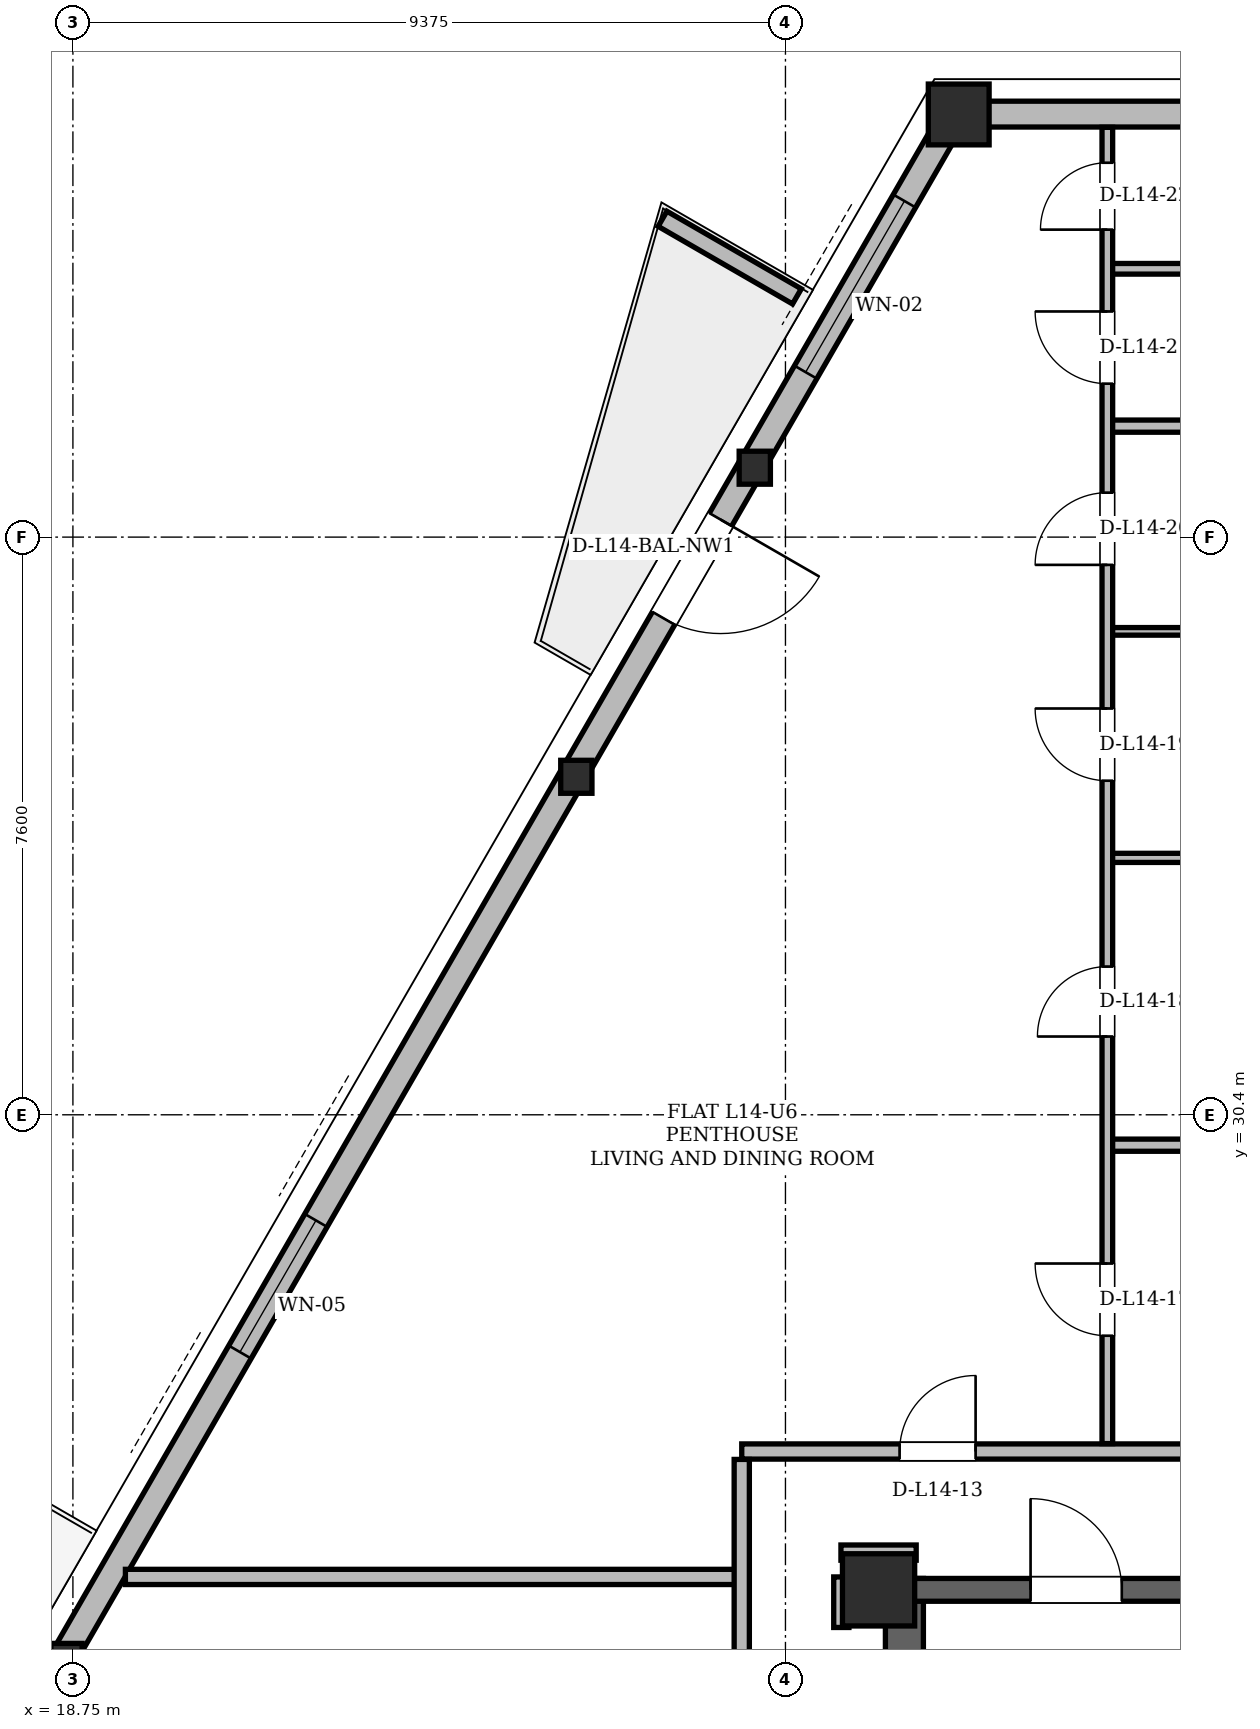
"""IFC4 building model, lengths in metres.
Left out: names, types, materials, properties, quantities, classifications, styles, units other than length and angle.
Written with IfcOpenShell. Run it as: python <this file> out.ifc"""

import sys

from ifc_helpers import new_model, si_unit, direction, frame, frame_2d, origin, origin_2d, place, context, subcontext, project, spatial, polyline, rectangle, hollow_rectangle, i_section, outline, extrude, element, fill, save


model = new_model("IFC4")
c1 = context("Model", 3, precision=1e-05, world=origin(), true_north=direction((0.0, 1.0)))
c2 = subcontext(c1, "Body", "Model", "MODEL_VIEW")
j1 = project(units=[si_unit("LENGTHUNIT", "METRE"), si_unit("PLANEANGLEUNIT", "RADIAN")], contexts=[c1])
p1 = place(None, origin())
s1 = spatial("IfcSite", under=j1, at=p1, CompositionType="ELEMENT")
p2 = place(p1, origin())
s2 = spatial("IfcBuilding", under=s1, at=p2, CompositionType="ELEMENT")
p3 = place(p2, frame((0.0, 0.0, 56.1)))
s3 = spatial("IfcBuildingStorey", under=s2, at=p3, CompositionType="ELEMENT", Elevation=56.1)
p4 = place(p3, frame((29.35, 24.15, 0.0), z_axis=(0.0, 0.0, 1.0), x_axis=(1.0, 0.0, 0.0)))
e1 = element("IfcColumn", 1, at=p4, inside=s3, PredefinedType="COLUMN", context=c2, shape_type="SweptSolid", body=[
    extrude(hollow_rectangle(XDim=0.95, YDim=0.95, WallThickness=0.08, at=origin_2d()), origin(), (0.0, 0.0, 1.0), 3.6),
])
p5 = place(p3, frame((30.351, 43.565, 0.004), z_axis=(0.029832289398, -0.002582293843, 0.999551582595), x_axis=(0.08623789021, 0.996274573746, 0.0)))
e2 = element("IfcColumn", 2, at=p5, inside=s3, PredefinedType="COLUMN", context=c2, shape_type="SweptSolid", body=[
    extrude(hollow_rectangle(XDim=0.8, YDim=0.8, WallThickness=0.065, at=origin_2d()), origin(), (0.0, 0.0, 1.0), 3.593),
])
for number, where, z_axis, x_axis in (
    (3, (27.671, 38.924, 0.004), (0.028, -0.006, 1.0), (0.214, 0.977, 0.0)),
    (4, (25.327, 34.863, 0.004), (0.026, -0.009, 1.0), (0.335, 0.942, 0.0)),
    (5, (18.628, 23.26, 0.004), (0.021, -0.018, 1.0), (0.65, 0.76, 0.0)),
):
    element("IfcColumn", number, at=place(p3, frame(where, z_axis=z_axis, x_axis=x_axis)), inside=s3, PredefinedType="COLUMN", context=c2, shape_type="SweptSolid", body=[
        extrude(i_section(OverallWidth=0.411, OverallDepth=0.434, WebThickness=0.036, FlangeThickness=0.057, at=origin_2d()), origin(), (0.0, 0.0, 1.0), 3.593),
    ])
p6 = place(p3, frame((29.69, 11.0, 0.0), z_axis=(0.0, 0.0, 1.0), x_axis=(0.0, 1.0, 0.0)))
e6 = element("IfcWall", 6, at=p6, inside=s3, PredefinedType="SHEAR", context=c2, shape_type="SweptSolid", body=[
    extrude(rectangle(XDim=13.3, YDim=0.5, at=frame_2d((6.65, 0.0))), origin(), (0.0, 0.0, 1.0), 3.36),
])
p7 = place(p3, frame((29.65, 24.15, 0.0), z_axis=(0.0, 0.0, 1.0), x_axis=(1.0, 0.0, 0.0)))
e7 = element("IfcWall", 7, at=p7, inside=s3, PredefinedType="SHEAR", context=c2, shape_type="SweptSolid", body=[
    extrude(rectangle(XDim=15.7, YDim=0.3, at=frame_2d((7.85, 0.0))), origin(), (0.0, 0.0, 1.0), 3.36),
])
p8 = place(p7, frame((1.7, 0.0, 0.0)))
e8 = element("IfcOpeningElement", 8, at=p8, cuts=e7, PredefinedType="OPENING", context=c2, shape_type="SweptSolid", body=[
    extrude(rectangle(XDim=1.2, YDim=2.2, at=frame_2d((0.6, 1.1))), frame((0.0, 0.15, 0.0), z_axis=(0.0, -1.0, 0.0), x_axis=(1.0, 0.0, 0.0)), (0.0, 0.0, 1.0), 0.3),
])
p9 = place(p7, frame((12.8, 0.0, 0.0)))
e9 = element("IfcOpeningElement", 9, at=p9, cuts=e7, PredefinedType="OPENING", context=c2, shape_type="SweptSolid", body=[
    extrude(rectangle(XDim=1.2, YDim=2.2, at=frame_2d((0.6, 1.1))), frame((0.0, 0.15, 0.0), z_axis=(0.0, -1.0, 0.0), x_axis=(1.0, 0.0, 0.0)), (0.0, 0.0, 1.0), 0.3),
])
p10 = place(p7, frame((6.55, 0.0, 0.0)))
e10 = element("IfcOpeningElement", 10, at=p10, cuts=e7, PredefinedType="OPENING", context=c2, shape_type="SweptSolid", body=[
    extrude(rectangle(XDim=0.9, YDim=2.05, at=frame_2d((0.45, 1.025))), frame((0.0, 0.15, 0.0), z_axis=(0.0, -1.0, 0.0), x_axis=(1.0, 0.0, 0.0)), (0.0, 0.0, 1.0), 0.3),
])
p11 = place(p7, frame((8.45, 0.0, 0.0)))
e11 = element("IfcOpeningElement", 11, at=p11, cuts=e7, PredefinedType="OPENING", context=c2, shape_type="SweptSolid", body=[
    extrude(rectangle(XDim=0.9, YDim=2.05, at=frame_2d((0.45, 1.025))), frame((0.0, 0.15, 0.0), z_axis=(0.0, -1.0, 0.0), x_axis=(1.0, 0.0, 0.0)), (0.0, 0.0, 1.0), 0.3),
])
p12 = place(p3, frame((44.649, 43.565, 0.0), z_axis=(0.0, 0.0, 1.0), x_axis=(-1.0, 0.0, 0.0)))
e12 = element("IfcWall", 12, at=p12, inside=s3, PredefinedType="SOLIDWALL", context=c2, shape_type="SweptSolid", body=[
    extrude(rectangle(XDim=14.298, YDim=0.34, at=frame_2d((7.149, 0.0))), origin(), (0.0, 0.0, 1.0), 2.494),
])
p13 = place(p3, frame((30.351, 43.565, 0.0), z_axis=(0.0, 0.0, 1.0), x_axis=(-0.500002389912, -0.866024023964, 0.0)))
e13 = element("IfcWall", 13, at=p13, inside=s3, PredefinedType="SOLIDWALL", context=c2, shape_type="SweptSolid", body=[
    extrude(rectangle(XDim=33.494, YDim=0.34, at=frame_2d((16.747, 0.0))), origin(), (0.0, 0.0, 1.0), 2.494),
])
p14 = place(p13, frame((6.159, 0.0, 0.0)))
e14 = element("IfcOpeningElement", 14, at=p14, cuts=e13, PredefinedType="OPENING", context=c2, shape_type="SweptSolid", body=[
    extrude(rectangle(XDim=1.5, YDim=2.2, at=frame_2d((0.75, 1.1))), frame((0.0, 0.17, 0.0), z_axis=(0.0, -1.0, 0.0), x_axis=(1.0, 0.0, 0.0)), (0.0, 0.0, 1.0), 0.34),
])
p15 = place(p13, frame((24.379, 0.0, 0.0)))
e15 = element("IfcOpeningElement", 15, at=p15, cuts=e13, PredefinedType="OPENING", context=c2, shape_type="SweptSolid", body=[
    extrude(rectangle(XDim=1.5, YDim=2.2, at=frame_2d((0.75, 1.1))), frame((0.0, 0.17, 0.0), z_axis=(0.0, -1.0, 0.0), x_axis=(1.0, 0.0, 0.0)), (0.0, 0.0, 1.0), 0.34),
])
p16 = place(p13, frame((29.886, 0.0, 0.85)))
e16 = element("IfcOpeningElement", 16, at=p16, cuts=e13, PredefinedType="OPENING", context=c2, shape_type="SweptSolid", body=[
    extrude(rectangle(XDim=2.2, YDim=1.534, at=frame_2d((1.1, 0.767))), frame((0.0, 0.17, 0.0), z_axis=(0.0, -1.0, 0.0), x_axis=(1.0, 0.0, 0.0)), (0.0, 0.0, 1.0), 0.34),
])
p17 = place(p13, frame((1.32, 0.0, 0.85)))
e17 = element("IfcOpeningElement", 17, at=p17, cuts=e13, PredefinedType="OPENING", context=c2, shape_type="SweptSolid", body=[
    extrude(rectangle(XDim=2.6, YDim=1.534, at=frame_2d((1.3, 0.767))), frame((0.0, 0.17, 0.0), z_axis=(0.0, -1.0, 0.0), x_axis=(1.0, 0.0, 0.0)), (0.0, 0.0, 1.0), 0.34),
])
p18 = place(p13, frame((16.806, 0.0, 0.85)))
e18 = element("IfcOpeningElement", 18, at=p18, cuts=e13, PredefinedType="OPENING", context=c2, shape_type="SweptSolid", body=[
    extrude(rectangle(XDim=2.0, YDim=1.534, at=frame_2d((1.0, 0.767))), frame((0.0, 0.17, 0.0), z_axis=(0.0, -1.0, 0.0), x_axis=(1.0, 0.0, 0.0)), (0.0, 0.0, 1.0), 0.34),
])
p19 = place(p3, frame((28.276, 41.167, 0.0), z_axis=(0.0, 0.0, 1.0), x_axis=(-0.866012356593, 0.500022597718, 0.0)))
e19 = element("IfcWall", 19, at=p19, inside=s3, PredefinedType="PARAPET", context=c2, shape_type="SweptSolid", body=[
    extrude(outline(polyline([(0.0, 0.0), (2.042, 0.0), (2.042, 1.1), (0.0, 1.32), (0.0, 0.0)])), frame((0.0, 0.115, 0.0), z_axis=(0.0, -1.0, 0.0), x_axis=(1.0, 0.0, 0.0)), (0.0, 0.0, 1.0), 0.23),
])
p20 = place(p3, frame((19.441, 24.32, 0.0), z_axis=(0.0, 0.0, 1.0), x_axis=(1.0, 0.0, 0.0)))
e20 = element("IfcWall", 20, at=p20, inside=s3, PredefinedType="PARTITIONING", context=c2, shape_type="SweptSolid", body=[
    extrude(rectangle(XDim=8.109, YDim=0.2, at=frame_2d((4.055, 0.0))), origin(), (0.0, 0.0, 1.0), 2.494),
])
p21 = place(p3, frame((28.855, 24.64, 0.0), z_axis=(0.0, 0.0, 1.0), x_axis=(1.0, 0.0, 0.0)))
e21 = element("IfcWall", 21, at=p21, inside=s3, PredefinedType="PARTITIONING", context=c2, shape_type="SweptSolid", body=[
    extrude(rectangle(XDim=0.99, YDim=0.2, at=frame_2d((0.495, 0.0))), origin(), (0.0, 0.0, 1.0), 2.738),
])
p22 = place(p3, frame((27.55, 25.97, 0.0), z_axis=(0.0, 0.0, 1.0), x_axis=(1.0, 0.0, 0.0)))
e22 = element("IfcWall", 22, at=p22, inside=s3, PredefinedType="PARTITIONING", context=c2, shape_type="SweptSolid", body=[
    extrude(rectangle(XDim=19.9, YDim=0.2, at=frame_2d((9.95, 0.0))), origin(), (0.0, 0.0, 1.0), 2.738),
])
p23 = place(p22, frame((2.077, 0.0, 0.0)))
e23 = element("IfcOpeningElement", 23, at=p23, cuts=e22, PredefinedType="OPENING", context=c2, shape_type="SweptSolid", body=[
    extrude(rectangle(XDim=1.0, YDim=2.18, at=frame_2d((0.5, 1.09))), frame((0.0, 0.1, 0.0), z_axis=(0.0, -1.0, 0.0), x_axis=(1.0, 0.0, 0.0)), (0.0, 0.0, 1.0), 0.2),
])
p24 = place(p22, frame((7.8, 0.0, 0.0)))
e24 = element("IfcOpeningElement", 24, at=p24, cuts=e22, PredefinedType="OPENING", context=c2, shape_type="SweptSolid", body=[
    extrude(rectangle(XDim=1.3, YDim=2.2, at=frame_2d((0.65, 1.1))), frame((0.0, 0.1, 0.0), z_axis=(0.0, -1.0, 0.0), x_axis=(1.0, 0.0, 0.0)), (0.0, 0.0, 1.0), 0.2),
])
p25 = place(p3, frame((32.364, 30.0, 0.0), z_axis=(0.0, 0.0, 1.0), x_axis=(1.0, 0.0, 0.0)))
e25 = element("IfcWall", 25, at=p25, inside=s3, PredefinedType="PARTITIONING", context=c2, shape_type="SweptSolid", body=[
    extrude(rectangle(XDim=1.286, YDim=0.16, at=frame_2d((0.643, 0.0))), origin(), (0.0, 0.0, 1.0), 3.36),
])
p26 = place(p3, frame((32.364, 33.78, 0.0), z_axis=(0.0, 0.0, 1.0), x_axis=(1.0, 0.0, 0.0)))
e26 = element("IfcWall", 26, at=p26, inside=s3, PredefinedType="PARTITIONING", context=c2, shape_type="SweptSolid", body=[
    extrude(rectangle(XDim=5.086, YDim=0.12, at=frame_2d((2.543, 0.0))), origin(), (0.0, 0.0, 1.0), 3.36),
])
p27 = place(p3, frame((32.364, 36.76, 0.0), z_axis=(0.0, 0.0, 1.0), x_axis=(1.0, 0.0, 0.0)))
e27 = element("IfcWall", 27, at=p27, inside=s3, PredefinedType="PARTITIONING", context=c2, shape_type="SweptSolid", body=[
    extrude(rectangle(XDim=5.086, YDim=0.1, at=frame_2d((2.543, 0.0))), origin(), (0.0, 0.0, 1.0), 3.36),
])
p28 = place(p3, frame((32.364, 39.46, 0.0), z_axis=(0.0, 0.0, 1.0), x_axis=(1.0, 0.0, 0.0)))
e28 = element("IfcWall", 28, at=p28, inside=s3, PredefinedType="PARTITIONING", context=c2, shape_type="SweptSolid", body=[
    extrude(rectangle(XDim=5.086, YDim=0.16, at=frame_2d((2.543, 0.0))), origin(), (0.0, 0.0, 1.0), 3.36),
])
p29 = place(p3, frame((32.364, 41.53, 0.0), z_axis=(0.0, 0.0, 1.0), x_axis=(1.0, 0.0, 0.0)))
e29 = element("IfcWall", 29, at=p29, inside=s3, PredefinedType="PARTITIONING", context=c2, shape_type="SweptSolid", body=[
    extrude(rectangle(XDim=5.086, YDim=0.14, at=frame_2d((2.543, 0.0))), origin(), (0.0, 0.0, 1.0), 3.36),
])
p30 = place(p3, frame((27.55, 11.054, 0.0), z_axis=(0.0, 0.0, 1.0), x_axis=(0.0, 1.0, 0.0)))
e30 = element("IfcWall", 30, at=p30, inside=s3, PredefinedType="PARTITIONING", context=c2, shape_type="SweptSolid", body=[
    extrude(rectangle(XDim=14.812, YDim=0.2, at=frame_2d((7.406, 0.0))), origin(), (0.0, 0.0, 1.0), 2.738),
])
p31 = place(p30, frame((7.932, 0.0, 0.0)))
e31 = element("IfcOpeningElement", 31, at=p31, cuts=e30, PredefinedType="OPENING", context=c2, shape_type="SweptSolid", body=[
    extrude(rectangle(XDim=1.0, YDim=2.18, at=frame_2d((0.5, 1.09))), frame((0.0, 0.1, 0.0), z_axis=(0.0, -1.0, 0.0), x_axis=(1.0, 0.0, 0.0)), (0.0, 0.0, 1.0), 0.2),
])
p32 = place(p3, frame((28.86, 23.655, 0.0), z_axis=(0.0, 0.0, 1.0), x_axis=(0.0, 1.0, 0.0)))
e32 = element("IfcWall", 32, at=p32, inside=s3, PredefinedType="PARTITIONING", context=c2, shape_type="SweptSolid", body=[
    extrude(rectangle(XDim=0.665, YDim=0.2, at=frame_2d((0.333, 0.0))), origin(), (0.0, 0.0, 1.0), 2.946),
])
p33 = place(p3, frame((32.36, 26.074, 0.0), z_axis=(0.0, 0.0, 1.0), x_axis=(0.0, 1.0, 0.0)))
e33 = element("IfcWall", 33, at=p33, inside=s3, PredefinedType="PARTITIONING", context=c2, shape_type="SweptSolid", body=[
    extrude(rectangle(XDim=17.317, YDim=0.14, at=frame_2d((8.659, 0.0))), origin(), (0.0, 0.0, 1.0), 3.36),
])
p34 = place(p33, frame((1.419, 0.0, 0.0)))
e34 = element("IfcOpeningElement", 34, at=p34, cuts=e33, PredefinedType="OPENING", context=c2, shape_type="SweptSolid", body=[
    extrude(rectangle(XDim=0.95, YDim=2.1, at=frame_2d((0.475, 1.05))), frame((0.0, 0.07, 0.0), z_axis=(0.0, -1.0, 0.0), x_axis=(1.0, 0.0, 0.0)), (0.0, 0.0, 1.0), 0.14),
])
p35 = place(p33, frame((5.356, 0.0, 0.0)))
e35 = element("IfcOpeningElement", 35, at=p35, cuts=e33, PredefinedType="OPENING", context=c2, shape_type="SweptSolid", body=[
    extrude(rectangle(XDim=0.92, YDim=2.12, at=frame_2d((0.46, 1.06))), frame((0.0, 0.07, 0.0), z_axis=(0.0, -1.0, 0.0), x_axis=(1.0, 0.0, 0.0)), (0.0, 0.0, 1.0), 0.14),
])
p36 = place(p33, frame((8.721, 0.0, 0.0)))
e36 = element("IfcOpeningElement", 36, at=p36, cuts=e33, PredefinedType="OPENING", context=c2, shape_type="SweptSolid", body=[
    extrude(rectangle(XDim=0.95, YDim=2.1, at=frame_2d((0.475, 1.05))), frame((0.0, 0.07, 0.0), z_axis=(0.0, -1.0, 0.0), x_axis=(1.0, 0.0, 0.0)), (0.0, 0.0, 1.0), 0.14),
])
p37 = place(p33, frame((11.561, 0.0, 0.0)))
e37 = element("IfcOpeningElement", 37, at=p37, cuts=e33, PredefinedType="OPENING", context=c2, shape_type="SweptSolid", body=[
    extrude(rectangle(XDim=0.95, YDim=2.1, at=frame_2d((0.475, 1.05))), frame((0.0, 0.07, 0.0), z_axis=(0.0, -1.0, 0.0), x_axis=(1.0, 0.0, 0.0)), (0.0, 0.0, 1.0), 0.14),
])
p38 = place(p33, frame((13.945, 0.0, 0.0)))
e38 = element("IfcOpeningElement", 38, at=p38, cuts=e33, PredefinedType="OPENING", context=c2, shape_type="SweptSolid", body=[
    extrude(rectangle(XDim=0.95, YDim=2.1, at=frame_2d((0.475, 1.05))), frame((0.0, 0.07, 0.0), z_axis=(0.0, -1.0, 0.0), x_axis=(1.0, 0.0, 0.0)), (0.0, 0.0, 1.0), 0.14),
])
p39 = place(p33, frame((15.971, 0.0, 0.0)))
e39 = element("IfcOpeningElement", 39, at=p39, cuts=e33, PredefinedType="OPENING", context=c2, shape_type="SweptSolid", body=[
    extrude(rectangle(XDim=0.88, YDim=2.08, at=frame_2d((0.44, 1.04))), frame((0.0, 0.07, 0.0), z_axis=(0.0, -1.0, 0.0), x_axis=(1.0, 0.0, 0.0)), (0.0, 0.0, 1.0), 0.14),
])
p40 = place(p14, origin())
e40 = element("IfcDoor", 40, at=p40, inside=s3, OperationType="SINGLE_SWING_LEFT", PredefinedType="DOOR", context=c2, shape_type="SweptSolid", body=[
    extrude(rectangle(XDim=1.5, YDim=2.2, at=frame_2d((0.75, 1.1))), frame((0.0, 0.025, 0.0), z_axis=(0.0, -1.0, 0.0), x_axis=(1.0, 0.0, 0.0)), (0.0, 0.0, 1.0), 0.05),
])
fill(e14, e40)
p41 = place(p17, origin())
e41 = element("IfcWindow", 41, at=p41, inside=s3, PartitioningType="SINGLE_PANEL", PredefinedType="WINDOW", context=c2, shape_type="SweptSolid", body=[
    extrude(rectangle(XDim=2.6, YDim=1.534, at=frame_2d((1.3, 0.767))), frame((0.0, 0.03, 0.0), z_axis=(0.0, -1.0, 0.0), x_axis=(1.0, 0.0, 0.0)), (0.0, 0.0, 1.0), 0.06),
])
fill(e17, e41)
p42 = place(p18, origin())
e42 = element("IfcWindow", 42, at=p42, inside=s3, PartitioningType="SINGLE_PANEL", PredefinedType="WINDOW", context=c2, shape_type="SweptSolid", body=[
    extrude(rectangle(XDim=2.0, YDim=1.534, at=frame_2d((1.0, 0.767))), frame((0.0, 0.03, 0.0), z_axis=(0.0, -1.0, 0.0), x_axis=(1.0, 0.0, 0.0)), (0.0, 0.0, 1.0), 0.06),
])
fill(e18, e42)
p43 = place(p8, origin())
e43 = element("IfcDoor", 43, at=p43, inside=s3, OperationType="SINGLE_SWING_LEFT", PredefinedType="DOOR", context=c2, shape_type="SweptSolid", body=[
    extrude(rectangle(XDim=1.2, YDim=2.2, at=frame_2d((0.6, 1.1))), frame((0.0, 0.025, 0.0), z_axis=(0.0, -1.0, 0.0), x_axis=(1.0, 0.0, 0.0)), (0.0, 0.0, 1.0), 0.05),
])
fill(e8, e43)
p44 = place(p23, origin())
e44 = element("IfcDoor", 44, at=p44, inside=s3, OperationType="SINGLE_SWING_RIGHT", PredefinedType="DOOR", context=c2, shape_type="SweptSolid", body=[
    extrude(rectangle(XDim=1.0, YDim=2.18, at=frame_2d((0.5, 1.09))), frame((0.0, 0.025, 0.0), z_axis=(0.0, -1.0, 0.0), x_axis=(1.0, 0.0, 0.0)), (0.0, 0.0, 1.0), 0.05),
])
fill(e23, e44)
p45 = place(p34, origin())
e45 = element("IfcDoor", 45, at=p45, inside=s3, OperationType="SINGLE_SWING_RIGHT", PredefinedType="DOOR", context=c2, shape_type="SweptSolid", body=[
    extrude(rectangle(XDim=0.95, YDim=2.1, at=frame_2d((0.475, 1.05))), frame((0.0, 0.025, 0.0), z_axis=(0.0, -1.0, 0.0), x_axis=(1.0, 0.0, 0.0)), (0.0, 0.0, 1.0), 0.05),
])
fill(e34, e45)
p46 = place(p35, origin())
e46 = element("IfcDoor", 46, at=p46, inside=s3, OperationType="SINGLE_SWING_LEFT", PredefinedType="DOOR", context=c2, shape_type="SweptSolid", body=[
    extrude(rectangle(XDim=0.92, YDim=2.12, at=frame_2d((0.46, 1.06))), frame((0.0, 0.025, 0.0), z_axis=(0.0, -1.0, 0.0), x_axis=(1.0, 0.0, 0.0)), (0.0, 0.0, 1.0), 0.05),
])
fill(e35, e46)
p47 = place(p36, origin())
e47 = element("IfcDoor", 47, at=p47, inside=s3, OperationType="SINGLE_SWING_RIGHT", PredefinedType="DOOR", context=c2, shape_type="SweptSolid", body=[
    extrude(rectangle(XDim=0.95, YDim=2.1, at=frame_2d((0.475, 1.05))), frame((0.0, 0.025, 0.0), z_axis=(0.0, -1.0, 0.0), x_axis=(1.0, 0.0, 0.0)), (0.0, 0.0, 1.0), 0.05),
])
fill(e36, e47)
p48 = place(p37, origin())
e48 = element("IfcDoor", 48, at=p48, inside=s3, OperationType="SINGLE_SWING_LEFT", PredefinedType="DOOR", context=c2, shape_type="SweptSolid", body=[
    extrude(rectangle(XDim=0.95, YDim=2.1, at=frame_2d((0.475, 1.05))), frame((0.0, 0.025, 0.0), z_axis=(0.0, -1.0, 0.0), x_axis=(1.0, 0.0, 0.0)), (0.0, 0.0, 1.0), 0.05),
])
fill(e37, e48)
p49 = place(p38, origin())
e49 = element("IfcDoor", 49, at=p49, inside=s3, OperationType="SINGLE_SWING_RIGHT", PredefinedType="DOOR", context=c2, shape_type="SweptSolid", body=[
    extrude(rectangle(XDim=0.95, YDim=2.1, at=frame_2d((0.475, 1.05))), frame((0.0, 0.025, 0.0), z_axis=(0.0, -1.0, 0.0), x_axis=(1.0, 0.0, 0.0)), (0.0, 0.0, 1.0), 0.05),
])
fill(e38, e49)
p50 = place(p39, origin())
e50 = element("IfcDoor", 50, at=p50, inside=s3, OperationType="SINGLE_SWING_LEFT", PredefinedType="DOOR", context=c2, shape_type="SweptSolid", body=[
    extrude(rectangle(XDim=0.88, YDim=2.08, at=frame_2d((0.44, 1.04))), frame((0.0, 0.025, 0.0), z_axis=(0.0, -1.0, 0.0), x_axis=(1.0, 0.0, 0.0)), (0.0, 0.0, 1.0), 0.05),
])
fill(e39, e50)
save(model, sys.argv[1])
